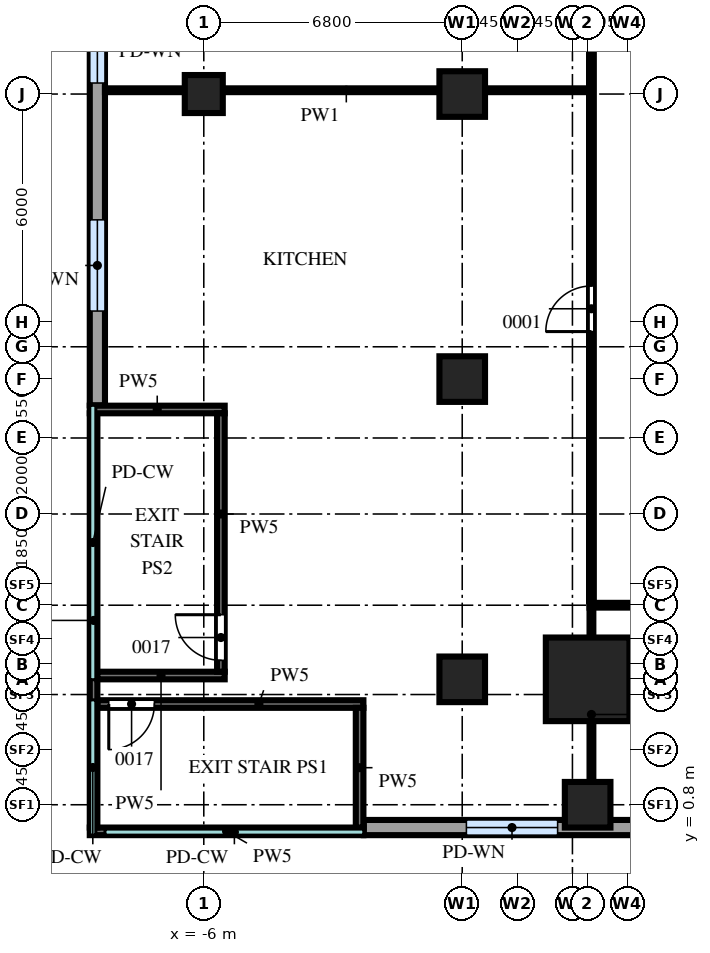
"""IFC4 building model, lengths in metres.
Left out: names, types, materials, properties, quantities, classifications, styles, units other than length and angle.
Written with IfcOpenShell. Run it as: python <this file> out.ifc"""

import sys

from ifc_helpers import new_model, si_unit, direction, frame, frame_2d, origin, origin_2d, place, context, subcontext, project, spatial, rectangle, extrude, source, transform, mapped, element, fill, save


model = new_model("IFC4")
c1 = context("Model", 3, precision=1e-05, world=origin(), true_north=direction((0.0, 1.0)))
c2 = subcontext(c1, "Body", "Model", "MODEL_VIEW")
j1 = project(units=[si_unit("LENGTHUNIT", "METRE"), si_unit("PLANEANGLEUNIT", "RADIAN")], contexts=[c1])
p1 = place(None, origin())
s1 = spatial("IfcSite", under=j1, at=p1, CompositionType="ELEMENT")
p2 = place(p1, origin())
s2 = spatial("IfcBuilding", under=s1, at=p2, CompositionType="ELEMENT")
p3 = place(p2, frame((0.0, 0.0, 13.0)))
s3 = spatial("IfcBuildingStorey", under=s2, at=p3, CompositionType="ELEMENT", Elevation=13.0)
m1 = source(origin(), c2, "Body", "SweptSolid", [
    extrude(rectangle(XDim=2.2, YDim=2.2, at=origin_2d()), origin(), (0.0, 0.0, 1.0), 5.2),
])
p4 = place(p3, frame((4.1, 4.1, 0.0), z_axis=(0.0, 0.0, 1.0), x_axis=(1.0, 0.0, 0.0)))
e1 = element("IfcColumn", 1, at=p4, inside=s3, PredefinedType="COLUMN", context=c2, shape_type="MappedRepresentation", body=[
    mapped(m1, transform((0.0, 0.0, 0.0))),
])
m2 = source(origin(), c2, "Body", "SweptSolid", [
    extrude(rectangle(XDim=1.2, YDim=1.2, at=origin_2d()), origin(), (0.0, 0.0, 1.0), 5.2),
])
for number, where, z_axis, x_axis in (
    (2, (4.1, 0.8, 0.0), (0.0, 0.0, 1.0), (1.0, 0.0, 0.0)),
    (3, (0.8, 4.1, 0.0), (0.0, 0.0, 1.0), (1.0, 0.0, 0.0)),
    (4, (0.8, 12.0, 0.0), (0.0, 0.0, 1.0), (1.0, 0.0, 0.0)),
    (5, (0.8, 19.5, 0.0), (0.0, 0.0, 1.0), (1.0, 0.0, 0.0)),
):
    element("IfcColumn", number, at=place(p3, frame(where, z_axis=z_axis, x_axis=x_axis)), inside=s3, PredefinedType="COLUMN", context=c2, shape_type="MappedRepresentation", body=[
        mapped(m2, transform((0.0, 0.0, 0.0))),
    ])
m3 = source(origin(), c2, "Body", "SweptSolid", [
    extrude(rectangle(XDim=1.0, YDim=1.0, at=origin_2d()), origin(), (0.0, 0.0, 1.0), 5.2),
])
p5 = place(p3, frame((-6.0, 19.5, 0.0), z_axis=(0.0, 0.0, 1.0), x_axis=(1.0, 0.0, 0.0)))
e6 = element("IfcColumn", 6, at=p5, inside=s3, PredefinedType="COLUMN", context=c2, shape_type="MappedRepresentation", body=[
    mapped(m3, transform((0.0, 0.0, 0.0))),
])
m4 = source(origin(), c2, "Body", "SweptSolid", [
    extrude(rectangle(XDim=31.38, YDim=0.4, at=frame_2d((15.69, 0.0))), origin(), (0.0, 0.0, 1.0), 5.2),
])
p6 = place(p3, frame((-8.8, 42.69, 0.0), z_axis=(0.0, 0.0, 1.0), x_axis=(0.0, -1.0, 0.0)))
e7 = element("IfcWall", 7, at=p6, inside=s3, PredefinedType="SOLIDWALL", context=c2, shape_type="MappedRepresentation", body=[
    mapped(m4, transform((0.0, 0.0, 0.0))),
])
m5 = source(origin(), c2, "Body", "SweptSolid", [
    extrude(rectangle(XDim=2.4, YDim=2.4, at=frame_2d((1.2, 1.2))), frame((0.0, 0.21, 0.0), z_axis=(0.0, -1.0, 0.0), x_axis=(1.0, 0.0, 0.0)), (0.0, 0.0, 1.0), 0.42),
])
p7 = place(p6, frame((2.5, 0.0, 1.0)))
e8 = element("IfcOpeningElement", 8, at=p7, cuts=e7, PredefinedType="OPENING", context=c2, shape_type="MappedRepresentation", body=[
    mapped(m5, transform((0.0, 0.0, 0.0))),
])
p8 = place(p6, frame((8.5, 0.0, 1.0)))
e9 = element("IfcOpeningElement", 9, at=p8, cuts=e7, PredefinedType="OPENING", context=c2, shape_type="MappedRepresentation", body=[
    mapped(m5, transform((0.0, 0.0, 0.0))),
])
p9 = place(p6, frame((14.5, 0.0, 1.0)))
e10 = element("IfcOpeningElement", 10, at=p9, cuts=e7, PredefinedType="OPENING", context=c2, shape_type="MappedRepresentation", body=[
    mapped(m5, transform((0.0, 0.0, 0.0))),
])
p10 = place(p6, frame((20.5, 0.0, 1.0)))
e11 = element("IfcOpeningElement", 11, at=p10, cuts=e7, PredefinedType="OPENING", context=c2, shape_type="MappedRepresentation", body=[
    mapped(m5, transform((0.0, 0.0, 0.0))),
])
p11 = place(p6, frame((26.5, 0.0, 1.0)))
e12 = element("IfcOpeningElement", 12, at=p11, cuts=e7, PredefinedType="OPENING", context=c2, shape_type="MappedRepresentation", body=[
    mapped(m5, transform((0.0, 0.0, 0.0))),
])
m6 = source(origin(), c2, "Body", "SweptSolid", [
    extrude(rectangle(XDim=31.84, YDim=0.4, at=frame_2d((15.92, 0.0))), origin(), (0.0, 0.0, 1.0), 5.2),
])
p12 = place(p3, frame((-1.79, 0.2, 0.0), z_axis=(0.0, 0.0, 1.0), x_axis=(1.0, 0.0, 0.0)))
e13 = element("IfcWall", 13, at=p12, inside=s3, PredefinedType="SOLIDWALL", context=c2, shape_type="MappedRepresentation", body=[
    mapped(m6, transform((0.0, 0.0, 0.0))),
])
p13 = place(p12, frame((2.7, 0.0, 1.0)))
e14 = element("IfcOpeningElement", 14, at=p13, cuts=e13, PredefinedType="OPENING", context=c2, shape_type="MappedRepresentation", body=[
    mapped(m5, transform((0.0, 0.0, 0.0))),
])
p14 = place(p12, frame((8.7, 0.0, 1.0)))
e15 = element("IfcOpeningElement", 15, at=p14, cuts=e13, PredefinedType="OPENING", context=c2, shape_type="MappedRepresentation", body=[
    mapped(m5, transform((0.0, 0.0, 0.0))),
])
p15 = place(p12, frame((14.7, 0.0, 1.0)))
e16 = element("IfcOpeningElement", 16, at=p15, cuts=e13, PredefinedType="OPENING", context=c2, shape_type="MappedRepresentation", body=[
    mapped(m5, transform((0.0, 0.0, 0.0))),
])
m7 = source(origin(), c2, "Body", "SweptSolid", [
    extrude(rectangle(XDim=7.2, YDim=0.2, at=frame_2d((3.6, 0.0))), origin(), (0.0, 0.0, 1.0), 5.2),
])
p16 = place(p3, frame((-9.0, 0.1, 0.0), z_axis=(0.0, 0.0, 1.0), x_axis=(1.0, 0.0, 0.0)))
e17 = element("IfcWall", 17, at=p16, inside=s3, PredefinedType="PARTITIONING", context=c2, shape_type="MappedRepresentation", body=[
    mapped(m7, transform((0.0, 0.0, 0.0))),
])
m8 = source(origin(), c2, "Body", "SweptSolid", [
    extrude(rectangle(XDim=7.0, YDim=0.2, at=frame_2d((3.5, 0.0))), origin(), (0.0, 0.0, 1.0), 5.2),
])
p17 = place(p3, frame((-8.8, 3.45, 0.0), z_axis=(0.0, 0.0, 1.0), x_axis=(1.0, 0.0, 0.0)))
e18 = element("IfcWall", 18, at=p17, inside=s3, PredefinedType="PARTITIONING", context=c2, shape_type="MappedRepresentation", body=[
    mapped(m8, transform((0.0, 0.0, 0.0))),
])
m9 = source(origin(), c2, "Body", "SweptSolid", [
    extrude(rectangle(XDim=1.2, YDim=2.1, at=frame_2d((0.6, 1.05))), frame((0.0, 0.11, 0.0), z_axis=(0.0, -1.0, 0.0), x_axis=(1.0, 0.0, 0.0)), (0.0, 0.0, 1.0), 0.22),
])
p18 = place(p17, frame((0.3, 0.0, 0.0)))
e19 = element("IfcOpeningElement", 19, at=p18, cuts=e18, PredefinedType="OPENING", context=c2, shape_type="MappedRepresentation", body=[
    mapped(m9, transform((0.0, 0.0, 0.0))),
])
m10 = source(origin(), c2, "Body", "SweptSolid", [
    extrude(rectangle(XDim=10.9, YDim=0.2, at=frame_2d((5.45, 0.0))), origin(), (0.0, 0.0, 1.0), 5.2),
])
p19 = place(p3, frame((-8.9, 0.2, 0.0), z_axis=(0.0, 0.0, 1.0), x_axis=(0.0, 1.0, 0.0)))
e20 = element("IfcWall", 20, at=p19, inside=s3, PredefinedType="PARTITIONING", context=c2, shape_type="MappedRepresentation", body=[
    mapped(m10, transform((0.0, 0.0, 0.0))),
])
m11 = source(origin(), c2, "Body", "SweptSolid", [
    extrude(rectangle(XDim=3.15, YDim=0.2, at=frame_2d((1.575, 0.0))), origin(), (0.0, 0.0, 1.0), 5.2),
])
p20 = place(p3, frame((-1.9, 0.2, 0.0), z_axis=(0.0, 0.0, 1.0), x_axis=(0.0, 1.0, 0.0)))
e21 = element("IfcWall", 21, at=p20, inside=s3, PredefinedType="PARTITIONING", context=c2, shape_type="MappedRepresentation", body=[
    mapped(m11, transform((0.0, 0.0, 0.0))),
])
m12 = source(origin(), c2, "Body", "SweptSolid", [
    extrude(rectangle(XDim=3.35, YDim=0.2, at=frame_2d((1.675, 0.0))), origin(), (0.0, 0.0, 1.0), 5.2),
])
p21 = place(p3, frame((-8.8, 4.2, 0.0), z_axis=(0.0, 0.0, 1.0), x_axis=(1.0, 0.0, 0.0)))
e22 = element("IfcWall", 22, at=p21, inside=s3, PredefinedType="PARTITIONING", context=c2, shape_type="MappedRepresentation", body=[
    mapped(m12, transform((0.0, 0.0, 0.0))),
])
m13 = source(origin(), c2, "Body", "SweptSolid", [
    extrude(rectangle(XDim=3.55, YDim=0.2, at=frame_2d((1.775, 0.0))), origin(), (0.0, 0.0, 1.0), 5.2),
])
p22 = place(p3, frame((-9.0, 11.2, 0.0), z_axis=(0.0, 0.0, 1.0), x_axis=(1.0, 0.0, 0.0)))
e23 = element("IfcWall", 23, at=p22, inside=s3, PredefinedType="PARTITIONING", context=c2, shape_type="MappedRepresentation", body=[
    mapped(m13, transform((0.0, 0.0, 0.0))),
])
m14 = source(origin(), c2, "Body", "SweptSolid", [
    extrude(rectangle(XDim=6.8, YDim=0.2, at=frame_2d((3.4, 0.0))), origin(), (0.0, 0.0, 1.0), 5.2),
])
p23 = place(p3, frame((-5.55, 4.3, 0.0), z_axis=(0.0, 0.0, 1.0), x_axis=(0.0, 1.0, 0.0)))
e24 = element("IfcWall", 24, at=p23, inside=s3, PredefinedType="PARTITIONING", context=c2, shape_type="MappedRepresentation", body=[
    mapped(m14, transform((0.0, 0.0, 0.0))),
])
p24 = place(p23, frame((0.3, 0.0, 0.0)))
e25 = element("IfcOpeningElement", 25, at=p24, cuts=e24, PredefinedType="OPENING", context=c2, shape_type="MappedRepresentation", body=[
    mapped(m9, transform((0.0, 0.0, 0.0))),
])
m15 = source(origin(), c2, "Body", "SweptSolid", [
    extrude(rectangle(XDim=5.55, YDim=0.1, at=frame_2d((2.775, 0.0))), origin(), (0.0, 0.0, 1.0), 5.2),
])
p25 = place(p3, frame((4.2, 0.4, 0.0), z_axis=(0.0, 0.0, 1.0), x_axis=(0.0, 1.0, 0.0)))
e26 = element("IfcWall", 26, at=p25, inside=s3, PredefinedType="PARTITIONING", context=c2, shape_type="MappedRepresentation", body=[
    mapped(m15, transform((0.0, 0.0, 0.0))),
])
m16 = source(origin(), c2, "Body", "SweptSolid", [
    extrude(rectangle(XDim=22.3, YDim=0.125, at=frame_2d((11.15, 0.0))), origin(), (0.0, 0.0, 1.0), 5.2),
])
p26 = place(p3, frame((4.15, 6.05, 0.0), z_axis=(0.0, 0.0, 1.0), x_axis=(1.0, 0.0, 0.0)))
e27 = element("IfcWall", 27, at=p26, inside=s3, PredefinedType="PARTITIONING", context=c2, shape_type="MappedRepresentation", body=[
    mapped(m16, transform((0.0, 0.0, 0.0))),
])
m17 = source(origin(), c2, "Body", "SweptSolid", [
    extrude(rectangle(XDim=1.2, YDim=2.1, at=frame_2d((0.6, 1.05))), frame((0.0, 0.073, 0.0), z_axis=(0.0, -1.0, 0.0), x_axis=(1.0, 0.0, 0.0)), (0.0, 0.0, 1.0), 0.145),
])
p27 = place(p26, frame((9.2, 0.0, 0.0)))
e28 = element("IfcOpeningElement", 28, at=p27, cuts=e27, PredefinedType="OPENING", context=c2, shape_type="MappedRepresentation", body=[
    mapped(m17, transform((0.0, 0.0, 0.0))),
])
m18 = source(origin(), c2, "Body", "SweptSolid", [
    extrude(rectangle(XDim=41.8, YDim=0.125, at=frame_2d((20.9, 0.0))), origin(), (0.0, 0.0, 1.0), 5.2),
])
p28 = place(p3, frame((4.2, 6.15, 0.0), z_axis=(0.0, 0.0, 1.0), x_axis=(0.0, 1.0, 0.0)))
e29 = element("IfcWall", 29, at=p28, inside=s3, PredefinedType="PARTITIONING", context=c2, shape_type="MappedRepresentation", body=[
    mapped(m18, transform((0.0, 0.0, 0.0))),
])
p29 = place(p28, frame((7.1, 0.0, 0.0)))
e30 = element("IfcOpeningElement", 30, at=p29, cuts=e29, PredefinedType="OPENING", context=c2, shape_type="MappedRepresentation", body=[
    mapped(m17, transform((0.0, 0.0, 0.0))),
])
p30 = place(p28, frame((25.85, 0.0, 0.0)))
e31 = element("IfcOpeningElement", 31, at=p30, cuts=e29, PredefinedType="OPENING", context=c2, shape_type="MappedRepresentation", body=[
    mapped(m17, transform((0.0, 0.0, 0.0))),
])
m19 = source(origin(), c2, "Body", "SweptSolid", [
    extrude(rectangle(XDim=12.7, YDim=0.1, at=frame_2d((6.35, 0.0))), origin(), (0.0, 0.0, 1.0), 5.2),
])
p31 = place(p3, frame((-8.6, 19.6, 0.0), z_axis=(0.0, 0.0, 1.0), x_axis=(1.0, 0.0, 0.0)))
e32 = element("IfcWall", 32, at=p31, inside=s3, PredefinedType="PARTITIONING", context=c2, shape_type="MappedRepresentation", body=[
    mapped(m19, transform((0.0, 0.0, 0.0))),
])
m20 = source(origin(), c2, "Body", "SweptSolid", [
    extrude(rectangle(XDim=2.4, YDim=2.4, at=frame_2d((1.2, 1.2))), frame((0.0, 0.03, 0.0), z_axis=(0.0, -1.0, 0.0), x_axis=(1.0, 0.0, 0.0)), (0.0, 0.0, 1.0), 0.06),
])
p32 = place(p10, origin())
e33 = element("IfcWindow", 33, at=p32, inside=s3, PartitioningType="SINGLE_PANEL", PredefinedType="WINDOW", context=c2, shape_type="MappedRepresentation", body=[
    mapped(m20, transform((0.0, 0.0, 0.0))),
])
fill(e11, e33)
p33 = place(p11, origin())
e34 = element("IfcWindow", 34, at=p33, inside=s3, PartitioningType="SINGLE_PANEL", PredefinedType="WINDOW", context=c2, shape_type="MappedRepresentation", body=[
    mapped(m20, transform((0.0, 0.0, 0.0))),
])
fill(e12, e34)
p34 = place(p13, origin())
e35 = element("IfcWindow", 35, at=p34, inside=s3, PartitioningType="SINGLE_PANEL", PredefinedType="WINDOW", context=c2, shape_type="MappedRepresentation", body=[
    mapped(m20, transform((0.0, 0.0, 0.0))),
])
fill(e14, e35)
m21 = source(origin(), c2, "Body", "SweptSolid", [
    extrude(rectangle(XDim=1.2, YDim=2.1, at=frame_2d((0.6, 1.05))), frame((0.0, 0.025, 0.0), z_axis=(0.0, -1.0, 0.0), x_axis=(1.0, 0.0, 0.0)), (0.0, 0.0, 1.0), 0.05),
])
p35 = place(p29, origin())
e36 = element("IfcDoor", 36, at=p35, inside=s3, OperationType="SINGLE_SWING_RIGHT", PredefinedType="DOOR", context=c2, shape_type="MappedRepresentation", body=[
    mapped(m21, transform((0.0, 0.0, 0.0))),
])
fill(e30, e36)
p36 = place(p18, origin())
e37 = element("IfcDoor", 37, at=p36, inside=s3, OperationType="SINGLE_SWING_LEFT", PredefinedType="DOOR", context=c2, shape_type="MappedRepresentation", body=[
    mapped(m21, transform((0.0, 0.0, 0.0))),
])
fill(e19, e37)
p37 = place(p24, origin())
e38 = element("IfcDoor", 38, at=p37, inside=s3, OperationType="SINGLE_SWING_LEFT", PredefinedType="DOOR", context=c2, shape_type="MappedRepresentation", body=[
    mapped(m21, transform((0.0, 0.0, 0.0))),
])
fill(e25, e38)
save(model, sys.argv[1])
